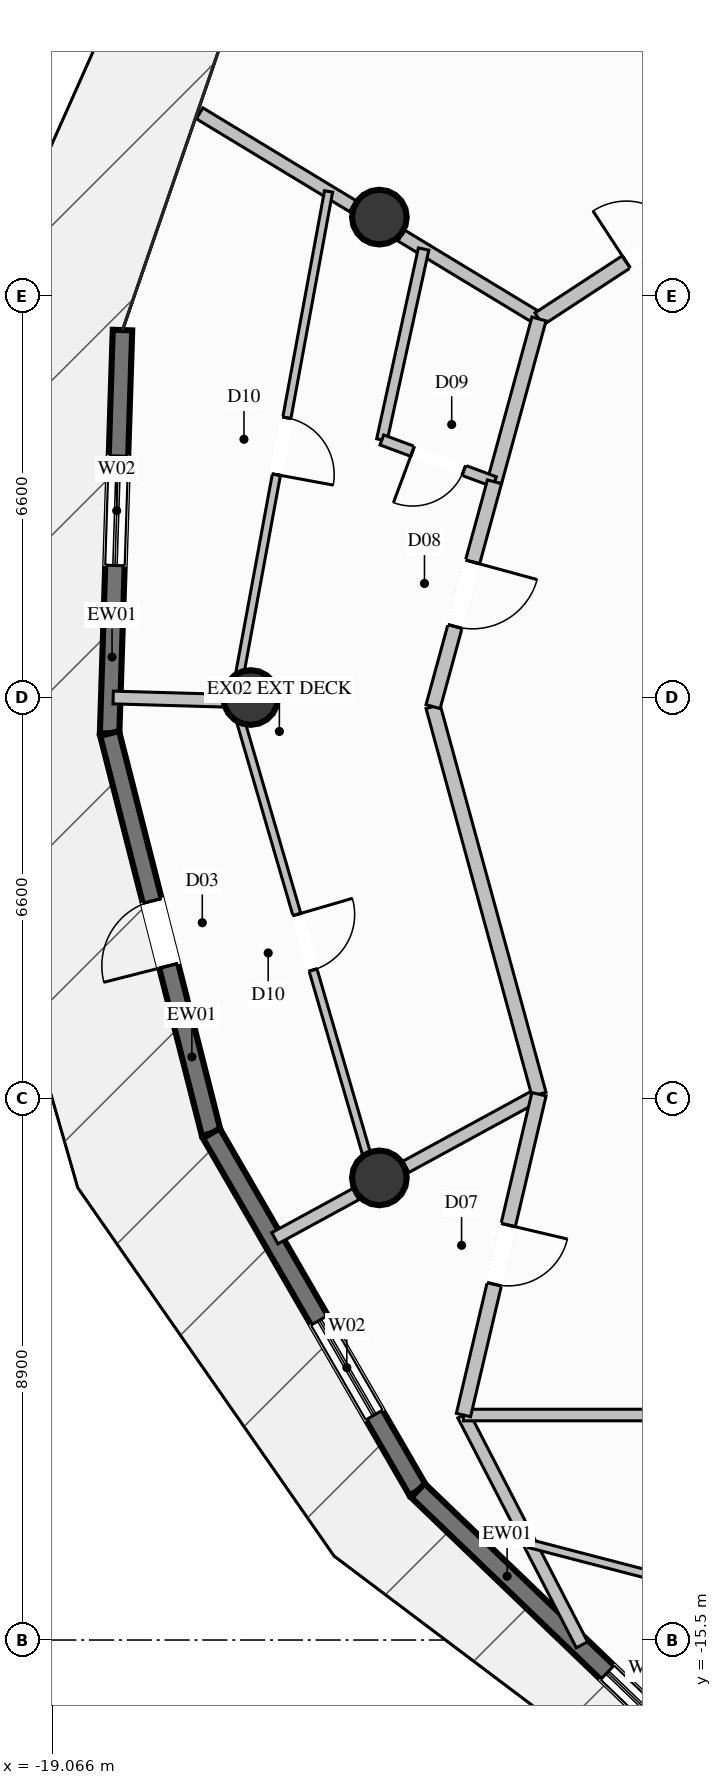
"""IFC4 building model, lengths in metres.
Left out: names, types, materials, properties, quantities, classifications, styles, units other than length and angle.
Written with IfcOpenShell. Run it as: python <this file> out.ifc"""

import sys

from ifc_helpers import new_model, si_unit, direction, frame, frame_2d, origin, origin_2d, place, context, subcontext, project, spatial, rectangle, circle, extrude, element, fill, save


model = new_model("IFC4")
c1 = context("Model", 3, precision=1e-05, world=origin(), true_north=direction((0.0, 1.0)))
c2 = subcontext(c1, "Body", "Model", "MODEL_VIEW")
j1 = project(units=[si_unit("LENGTHUNIT", "METRE"), si_unit("PLANEANGLEUNIT", "RADIAN")], contexts=[c1])
p1 = place(None, origin())
s1 = spatial("IfcSite", under=j1, at=p1, CompositionType="ELEMENT")
p2 = place(p1, origin())
s2 = spatial("IfcBuilding", under=s1, at=p2, CompositionType="ELEMENT")
p3 = place(p2, frame((0.0, 0.0, 212.8)))
s3 = spatial("IfcBuildingStorey", under=s2, at=p3, CompositionType="ELEMENT", Elevation=212.8)
for number, where, z_axis, x_axis in (
    (1, (-13.683, 7.9, 0.0), (0.0, 0.0, 1.0), (1.0, 0.0, 0.0)),
    (2, (-15.8, 0.0, 0.0), (0.0, 0.0, 1.0), (1.0, 0.0, 0.0)),
    (3, (-13.683, -7.9, 0.0), (0.0, 0.0, 1.0), (1.0, 0.0, 0.0)),
):
    element("IfcColumn", number, at=place(p3, frame(where, z_axis=z_axis, x_axis=x_axis)), inside=s3, PredefinedType="COLUMN", context=c2, shape_type="SweptSolid", body=[
        extrude(circle(Radius=0.45, at=origin_2d()), origin(), (0.0, 0.0, 1.0), 3.6),
    ])
p4 = place(p3, frame((-18.12, -0.591, 0.0), z_axis=(0.0, 0.0, 1.0), x_axis=(0.031968634483, 0.999488872579, 0.0)))
e4 = element("IfcWall", 4, at=p4, inside=s3, PredefinedType="SOLIDWALL", context=c2, shape_type="SweptSolid", body=[
    extrude(rectangle(XDim=6.636, YDim=0.32, at=frame_2d((3.318, 0.0))), origin(), (0.0, 0.0, 1.0), 3.36),
])
p5 = place(p4, frame((2.764, 0.0, 0.35)))
e5 = element("IfcOpeningElement", 5, at=p5, cuts=e4, PredefinedType="OPENING", context=c2, shape_type="SweptSolid", body=[
    extrude(rectangle(XDim=1.8, YDim=2.6, at=frame_2d((0.9, 1.3))), frame((0.0, 0.17, 0.0), z_axis=(0.0, -1.0, 0.0), x_axis=(1.0, 0.0, 0.0)), (0.0, 0.0, 1.0), 0.34),
])
p6 = place(p3, frame((-16.447, -7.167, 0.0), z_axis=(0.0, 0.0, 1.0), x_axis=(-0.246571763235, 0.969124535638, 0.0)))
e6 = element("IfcWall", 6, at=p6, inside=s3, PredefinedType="SOLIDWALL", context=c2, shape_type="SweptSolid", body=[
    extrude(rectangle(XDim=6.785, YDim=0.32, at=frame_2d((3.393, 0.0))), origin(), (0.0, 0.0, 1.0), 3.36),
])
p7 = place(p6, frame((2.843, 0.0, 0.0)))
e7 = element("IfcOpeningElement", 7, at=p7, cuts=e6, PredefinedType="OPENING", context=c2, shape_type="SweptSolid", body=[
    extrude(rectangle(XDim=1.1, YDim=2.2, at=frame_2d((0.55, 1.1))), frame((0.0, 0.17, 0.0), z_axis=(0.0, -1.0, 0.0), x_axis=(1.0, 0.0, 0.0)), (0.0, 0.0, 1.0), 0.34),
])
p8 = place(p3, frame((-13.05, -13.041, 0.0), z_axis=(0.0, 0.0, 1.0), x_axis=(-0.50061923795, 0.865667591281, 0.0)))
e8 = element("IfcWall", 8, at=p8, inside=s3, PredefinedType="SOLIDWALL", context=c2, shape_type="SweptSolid", body=[
    extrude(rectangle(XDim=6.786, YDim=0.32, at=frame_2d((3.393, 0.0))), origin(), (0.0, 0.0, 1.0), 3.36),
])
p9 = place(p8, frame((1.434, 0.0, 0.35)))
e9 = element("IfcOpeningElement", 9, at=p9, cuts=e8, PredefinedType="OPENING", context=c2, shape_type="SweptSolid", body=[
    extrude(rectangle(XDim=1.8, YDim=2.6, at=frame_2d((0.9, 1.3))), frame((0.0, 0.17, 0.0), z_axis=(0.0, -1.0, 0.0), x_axis=(1.0, 0.0, 0.0)), (0.0, 0.0, 1.0), 0.34),
])
p10 = place(p3, frame((-8.264, -17.638, 0.0), z_axis=(0.0, 0.0, 1.0), x_axis=(-0.721218944664, 0.69270717757, 0.0)))
e10 = element("IfcWall", 10, at=p10, inside=s3, PredefinedType="SOLIDWALL", context=c2, shape_type="SweptSolid", body=[
    extrude(rectangle(XDim=6.636, YDim=0.32, at=frame_2d((3.318, 0.0))), origin(), (0.0, 0.0, 1.0), 3.36),
])
p11 = place(p10, frame((0.516, 0.0, 0.35)))
e11 = element("IfcOpeningElement", 11, at=p11, cuts=e10, PredefinedType="OPENING", context=c2, shape_type="SweptSolid", body=[
    extrude(rectangle(XDim=1.8, YDim=2.6, at=frame_2d((0.9, 1.3))), frame((0.0, 0.17, 0.0), z_axis=(0.0, -1.0, 0.0), x_axis=(1.0, 0.0, 0.0)), (0.0, 0.0, 1.0), 0.34),
])
p12 = place(p3, frame((-11.058, 6.225, 0.0), z_axis=(0.0, 0.0, 1.0), x_axis=(-0.855337741011, 0.518070795164, 0.0)))
e12 = element("IfcWall", 12, at=p12, inside=s3, PredefinedType="PARTITIONING", context=c2, shape_type="SweptSolid", body=[
    extrude(rectangle(XDim=2.648, YDim=0.21, at=frame_2d((1.324, 0.0))), origin(), (0.0, 0.0, 1.0), 2.876),
])
p13 = place(p3, frame((-14.118, 8.079, 0.0), z_axis=(0.0, 0.0, 1.0), x_axis=(-0.855293458978, 0.518143897995, 0.0)))
e13 = element("IfcWall", 13, at=p13, inside=s3, PredefinedType="PARTITIONING", context=c2, shape_type="SweptSolid", body=[
    extrude(rectangle(XDim=2.949, YDim=0.21, at=frame_2d((1.474, 0.0))), origin(), (0.0, 0.0, 1.0), 3.36),
])
p14 = place(p3, frame((-11.058, -6.525, 0.0), z_axis=(0.0, 0.0, 1.0), x_axis=(-0.878056312433, -0.478557323836, 0.0)))
e14 = element("IfcWall", 14, at=p14, inside=s3, PredefinedType="PARTITIONING", context=c2, shape_type="SweptSolid", body=[
    extrude(rectangle(XDim=2.495, YDim=0.21, at=frame_2d((1.248, 0.0))), origin(), (0.0, 0.0, 1.0), 2.876),
])
p15 = place(p3, frame((-14.07, -8.167, 0.0), z_axis=(0.0, 0.0, 1.0), x_axis=(-0.878178167796, -0.478333676012, 0.0)))
e15 = element("IfcWall", 15, at=p15, inside=s3, PredefinedType="PARTITIONING", context=c2, shape_type="SweptSolid", body=[
    extrude(rectangle(XDim=1.518, YDim=0.21, at=frame_2d((0.759, 0.0))), origin(), (0.0, 0.0, 1.0), 3.36),
])
p16 = place(p3, frame((-11.058, 6.225, 0.0), z_axis=(0.0, 0.0, 1.0), x_axis=(0.83693466485, 0.547302810857, 0.0)))
e16 = element("IfcWall", 16, at=p16, inside=s3, PredefinedType="PARTITIONING", context=c2, shape_type="SweptSolid", body=[
    extrude(rectangle(XDim=4.43, YDim=0.24, at=frame_2d((2.215, 0.0))), origin(), (0.0, 0.0, 1.0), 3.36),
])
p17 = place(p16, frame((1.715, 0.0, 0.0)))
e17 = element("IfcOpeningElement", 17, at=p17, cuts=e16, PredefinedType="OPENING", context=c2, shape_type="SweptSolid", body=[
    extrude(rectangle(XDim=1.0, YDim=2.2, at=frame_2d((0.5, 1.1))), frame((0.0, 0.13, 0.0), z_axis=(0.0, -1.0, 0.0), x_axis=(1.0, 0.0, 0.0)), (0.0, 0.0, 1.0), 0.26),
])
p18 = place(p3, frame((-11.058, 6.225, 0.0), z_axis=(0.0, 0.0, 1.0), x_axis=(-0.263645685939, -0.964619589416, 0.0)))
e18 = element("IfcWall", 18, at=p18, inside=s3, PredefinedType="PARTITIONING", context=c2, shape_type="SweptSolid", body=[
    extrude(rectangle(XDim=2.776, YDim=0.24, at=frame_2d((1.388, 0.0))), origin(), (0.0, 0.0, 1.0), 3.36),
])
p19 = place(p3, frame((-12.956, 7.375, 0.0), z_axis=(0.0, 0.0, 1.0), x_axis=(-0.213517853704, -0.976939161949, 0.0)))
e19 = element("IfcWall", 19, at=p19, inside=s3, PredefinedType="PLUMBINGWALL", context=c2, shape_type="SweptSolid", body=[
    extrude(rectangle(XDim=3.213, YDim=0.175, at=frame_2d((1.606, 0.0))), origin(), (0.0, 0.0, 1.0), 3.36),
])
p20 = place(p3, frame((-11.79, 3.547, 0.0), z_axis=(0.0, 0.0, 1.0), x_axis=(-0.937250020912, 0.348657996179, 0.0)))
e20 = element("IfcWall", 20, at=p20, inside=s3, PredefinedType="PLUMBINGWALL", context=c2, shape_type="SweptSolid", body=[
    extrude(rectangle(XDim=1.976, YDim=0.175, at=frame_2d((0.988, 0.0))), origin(), (0.0, 0.0, 1.0), 3.36),
])
p21 = place(p20, frame((0.538, 0.0, 0.0)))
e21 = element("IfcOpeningElement", 21, at=p21, cuts=e20, PredefinedType="OPENING", context=c2, shape_type="SweptSolid", body=[
    extrude(rectangle(XDim=0.9, YDim=2.1, at=frame_2d((0.45, 1.05))), frame((0.0, 0.098, 0.0), z_axis=(0.0, -1.0, 0.0), x_axis=(1.0, 0.0, 0.0)), (0.0, 0.0, 1.0), 0.195),
])
p22 = place(p3, frame((-16.062, -0.057, 0.0), z_axis=(0.0, 0.0, 1.0), x_axis=(-0.999595365862, 0.028444763098, 0.0)))
e22 = element("IfcWall", 22, at=p22, inside=s3, PredefinedType="PARTITIONING", context=c2, shape_type="SweptSolid", body=[
    extrude(rectangle(XDim=2.0, YDim=0.21, at=frame_2d((1.0, 0.0))), origin(), (0.0, 0.0, 1.0), 3.36),
])
p23 = place(p3, frame((-12.8, -0.15, 0.0), z_axis=(0.0, 0.0, 1.0), x_axis=(0.263583131966, -0.96463668422, 0.0)))
e23 = element("IfcWall", 23, at=p23, inside=s3, PredefinedType="PARTITIONING", context=c2, shape_type="SweptSolid", body=[
    extrude(rectangle(XDim=6.609, YDim=0.24, at=frame_2d((3.304, 0.0))), origin(), (0.0, 0.0, 1.0), 3.36),
])
p24 = place(p3, frame((-11.79, 3.547, 0.0), z_axis=(0.0, 0.0, 1.0), x_axis=(-0.263537818226, -0.964649064875, 0.0)))
e24 = element("IfcWall", 24, at=p24, inside=s3, PredefinedType="PARTITIONING", context=c2, shape_type="SweptSolid", body=[
    extrude(rectangle(XDim=3.833, YDim=0.24, at=frame_2d((1.916, 0.0))), origin(), (0.0, 0.0, 1.0), 3.36),
])
p25 = place(p24, frame((1.366, 0.0, 0.0)))
e25 = element("IfcOpeningElement", 25, at=p25, cuts=e24, PredefinedType="OPENING", context=c2, shape_type="SweptSolid", body=[
    extrude(rectangle(XDim=1.1, YDim=2.3, at=frame_2d((0.55, 1.15))), frame((0.0, 0.13, 0.0), z_axis=(0.0, -1.0, 0.0), x_axis=(1.0, 0.0, 0.0)), (0.0, 0.0, 1.0), 0.26),
])
p26 = place(p3, frame((-14.519, 8.322, 0.0), z_axis=(0.0, 0.0, 1.0), x_axis=(-0.181104081298, -0.983463935148, 0.0)))
e26 = element("IfcWall", 26, at=p26, inside=s3, PredefinedType="PARTITIONING", context=c2, shape_type="SweptSolid", body=[
    extrude(rectangle(XDim=8.52, YDim=0.135, at=frame_2d((4.26, 0.0))), origin(), (0.0, 0.0, 1.0), 2.929),
])
p27 = place(p26, frame((3.785, 0.0, 0.0)))
e27 = element("IfcOpeningElement", 27, at=p27, cuts=e26, PredefinedType="OPENING", context=c2, shape_type="SweptSolid", body=[
    extrude(rectangle(XDim=0.95, YDim=2.1, at=frame_2d((0.475, 1.05))), frame((0.0, 0.078, 0.0), z_axis=(0.0, -1.0, 0.0), x_axis=(1.0, 0.0, 0.0)), (0.0, 0.0, 1.0), 0.155),
])
p28 = place(p3, frame((-16.062, -0.057, 0.0), z_axis=(0.0, 0.0, 1.0), x_axis=(0.27948501257, -0.960150054809, 0.0)))
e28 = element("IfcWall", 28, at=p28, inside=s3, PredefinedType="PARTITIONING", context=c2, shape_type="SweptSolid", body=[
    extrude(rectangle(XDim=8.265, YDim=0.135, at=frame_2d((4.133, 0.0))), origin(), (0.0, 0.0, 1.0), 2.929),
])
p29 = place(p28, frame((3.658, 0.0, 0.0)))
e29 = element("IfcOpeningElement", 29, at=p29, cuts=e28, PredefinedType="OPENING", context=c2, shape_type="SweptSolid", body=[
    extrude(rectangle(XDim=0.95, YDim=2.1, at=frame_2d((0.475, 1.05))), frame((0.0, 0.078, 0.0), z_axis=(0.0, -1.0, 0.0), x_axis=(1.0, 0.0, 0.0)), (0.0, 0.0, 1.0), 0.155),
])
p30 = place(p3, frame((-12.3, -11.8, 0.0), z_axis=(0.0, 0.0, 1.0), x_axis=(0.458363547269, -0.888764793708, 0.0)))
e30 = element("IfcWall", 30, at=p30, inside=s3, PredefinedType="PARTITIONING", context=c2, shape_type="SweptSolid", body=[
    extrude(rectangle(XDim=4.252, YDim=0.21, at=frame_2d((2.126, 0.0))), origin(), (0.0, 0.0, 1.0), 3.36),
])
p31 = place(p3, frame((-12.3, -11.8, 0.0), z_axis=(0.0, 0.0, 1.0), x_axis=(1.0, 0.0, 0.0)))
e31 = element("IfcWall", 31, at=p31, inside=s3, PredefinedType="PARTITIONING", context=c2, shape_type="SweptSolid", body=[
    extrude(rectangle(XDim=12.3, YDim=0.19, at=frame_2d((6.15, 0.0))), origin(), (0.0, 0.0, 1.0), 3.36),
])
p32 = place(p31, frame((5.675, 0.0, 0.0)))
e32 = element("IfcOpeningElement", 32, at=p32, cuts=e31, PredefinedType="OPENING", context=c2, shape_type="SweptSolid", body=[
    extrude(rectangle(XDim=0.95, YDim=2.1, at=frame_2d((0.475, 1.05))), frame((0.0, 0.105, 0.0), z_axis=(0.0, -1.0, 0.0), x_axis=(1.0, 0.0, 0.0)), (0.0, 0.0, 1.0), 0.21),
])
p33 = place(p3, frame((-11.058, -6.525, 0.0), z_axis=(0.0, 0.0, 1.0), x_axis=(-0.229167390813, -0.973387028364, 0.0)))
e33 = element("IfcWall", 33, at=p33, inside=s3, PredefinedType="PARTITIONING", context=c2, shape_type="SweptSolid", body=[
    extrude(rectangle(XDim=5.419, YDim=0.24, at=frame_2d((2.71, 0.0))), origin(), (0.0, 0.0, 1.0), 3.36),
])
p34 = place(p33, frame((2.21, 0.0, 0.0)))
e34 = element("IfcOpeningElement", 34, at=p34, cuts=e33, PredefinedType="OPENING", context=c2, shape_type="SweptSolid", body=[
    extrude(rectangle(XDim=1.0, YDim=2.2, at=frame_2d((0.5, 1.1))), frame((0.0, 0.13, 0.0), z_axis=(0.0, -1.0, 0.0), x_axis=(1.0, 0.0, 0.0)), (0.0, 0.0, 1.0), 0.26),
])
p35 = place(p3, frame((-11.209, -13.916, 0.0), z_axis=(0.0, 0.0, 1.0), x_axis=(0.967843403255, -0.251553467032, 0.0)))
e35 = element("IfcWall", 35, at=p35, inside=s3, PredefinedType="PARTITIONING", context=c2, shape_type="SweptSolid", body=[
    extrude(rectangle(XDim=11.835, YDim=0.135, at=frame_2d((5.917, 0.0))), origin(), (0.0, 0.0, 1.0), 3.36),
])
p36 = place(p35, frame((5.442, 0.0, 0.0)))
e36 = element("IfcOpeningElement", 36, at=p36, cuts=e35, PredefinedType="OPENING", context=c2, shape_type="SweptSolid", body=[
    extrude(rectangle(XDim=0.95, YDim=2.1, at=frame_2d((0.475, 1.05))), frame((0.0, 0.078, 0.0), z_axis=(0.0, -1.0, 0.0), x_axis=(1.0, 0.0, 0.0)), (0.0, 0.0, 1.0), 0.155),
])
p37 = place(p5, origin())
e37 = element("IfcWindow", 37, at=p37, inside=s3, PartitioningType="SINGLE_PANEL", PredefinedType="WINDOW", context=c2, shape_type="SweptSolid", body=[
    extrude(rectangle(XDim=1.8, YDim=2.6, at=frame_2d((0.9, 1.3))), frame((0.0, 0.03, 0.0), z_axis=(0.0, -1.0, 0.0), x_axis=(1.0, 0.0, 0.0)), (0.0, 0.0, 1.0), 0.06),
])
fill(e5, e37)
p38 = place(p7, origin())
e38 = element("IfcDoor", 38, at=p38, inside=s3, OperationType="SINGLE_SWING_LEFT", PredefinedType="DOOR", context=c2, shape_type="SweptSolid", body=[
    extrude(rectangle(XDim=1.1, YDim=2.2, at=frame_2d((0.55, 1.1))), frame((0.0, 0.025, 0.0), z_axis=(0.0, -1.0, 0.0), x_axis=(1.0, 0.0, 0.0)), (0.0, 0.0, 1.0), 0.05),
])
fill(e7, e38)
p39 = place(p9, origin())
e39 = element("IfcWindow", 39, at=p39, inside=s3, PartitioningType="SINGLE_PANEL", PredefinedType="WINDOW", context=c2, shape_type="SweptSolid", body=[
    extrude(rectangle(XDim=1.8, YDim=2.6, at=frame_2d((0.9, 1.3))), frame((0.0, 0.03, 0.0), z_axis=(0.0, -1.0, 0.0), x_axis=(1.0, 0.0, 0.0)), (0.0, 0.0, 1.0), 0.06),
])
fill(e9, e39)
p40 = place(p11, origin())
e40 = element("IfcWindow", 40, at=p40, inside=s3, PartitioningType="SINGLE_PANEL", PredefinedType="WINDOW", context=c2, shape_type="SweptSolid", body=[
    extrude(rectangle(XDim=1.8, YDim=2.6, at=frame_2d((0.9, 1.3))), frame((0.0, 0.03, 0.0), z_axis=(0.0, -1.0, 0.0), x_axis=(1.0, 0.0, 0.0)), (0.0, 0.0, 1.0), 0.06),
])
fill(e11, e40)
p41 = place(p17, origin())
e41 = element("IfcDoor", 41, at=p41, inside=s3, OperationType="SINGLE_SWING_LEFT", PredefinedType="DOOR", context=c2, shape_type="SweptSolid", body=[
    extrude(rectangle(XDim=1.0, YDim=2.2, at=frame_2d((0.5, 1.1))), frame((0.0, 0.025, 0.0), z_axis=(0.0, -1.0, 0.0), x_axis=(1.0, 0.0, 0.0)), (0.0, 0.0, 1.0), 0.05),
])
fill(e17, e41)
p42 = place(p21, origin())
e42 = element("IfcDoor", 42, at=p42, inside=s3, OperationType="SINGLE_SWING_RIGHT", PredefinedType="DOOR", context=c2, shape_type="SweptSolid", body=[
    extrude(rectangle(XDim=0.9, YDim=2.1, at=frame_2d((0.45, 1.05))), frame((0.0, 0.025, 0.0), z_axis=(0.0, -1.0, 0.0), x_axis=(1.0, 0.0, 0.0)), (0.0, 0.0, 1.0), 0.05),
])
fill(e21, e42)
p43 = place(p25, origin())
e43 = element("IfcDoor", 43, at=p43, inside=s3, OperationType="SINGLE_SWING_LEFT", PredefinedType="DOOR", context=c2, shape_type="SweptSolid", body=[
    extrude(rectangle(XDim=1.1, YDim=2.3, at=frame_2d((0.55, 1.15))), frame((0.0, 0.025, 0.0), z_axis=(0.0, -1.0, 0.0), x_axis=(1.0, 0.0, 0.0)), (0.0, 0.0, 1.0), 0.05),
])
fill(e25, e43)
p44 = place(p27, origin())
e44 = element("IfcDoor", 44, at=p44, inside=s3, OperationType="SINGLE_SWING_RIGHT", PredefinedType="DOOR", context=c2, shape_type="SweptSolid", body=[
    extrude(rectangle(XDim=0.95, YDim=2.1, at=frame_2d((0.475, 1.05))), frame((0.0, 0.025, 0.0), z_axis=(0.0, -1.0, 0.0), x_axis=(1.0, 0.0, 0.0)), (0.0, 0.0, 1.0), 0.05),
])
fill(e27, e44)
p45 = place(p29, origin())
e45 = element("IfcDoor", 45, at=p45, inside=s3, OperationType="SINGLE_SWING_LEFT", PredefinedType="DOOR", context=c2, shape_type="SweptSolid", body=[
    extrude(rectangle(XDim=0.95, YDim=2.1, at=frame_2d((0.475, 1.05))), frame((0.0, 0.025, 0.0), z_axis=(0.0, -1.0, 0.0), x_axis=(1.0, 0.0, 0.0)), (0.0, 0.0, 1.0), 0.05),
])
fill(e29, e45)
p46 = place(p34, origin())
e46 = element("IfcDoor", 46, at=p46, inside=s3, OperationType="SINGLE_SWING_LEFT", PredefinedType="DOOR", context=c2, shape_type="SweptSolid", body=[
    extrude(rectangle(XDim=1.0, YDim=2.2, at=frame_2d((0.5, 1.1))), frame((0.0, 0.025, 0.0), z_axis=(0.0, -1.0, 0.0), x_axis=(1.0, 0.0, 0.0)), (0.0, 0.0, 1.0), 0.05),
])
fill(e34, e46)
save(model, sys.argv[1])
